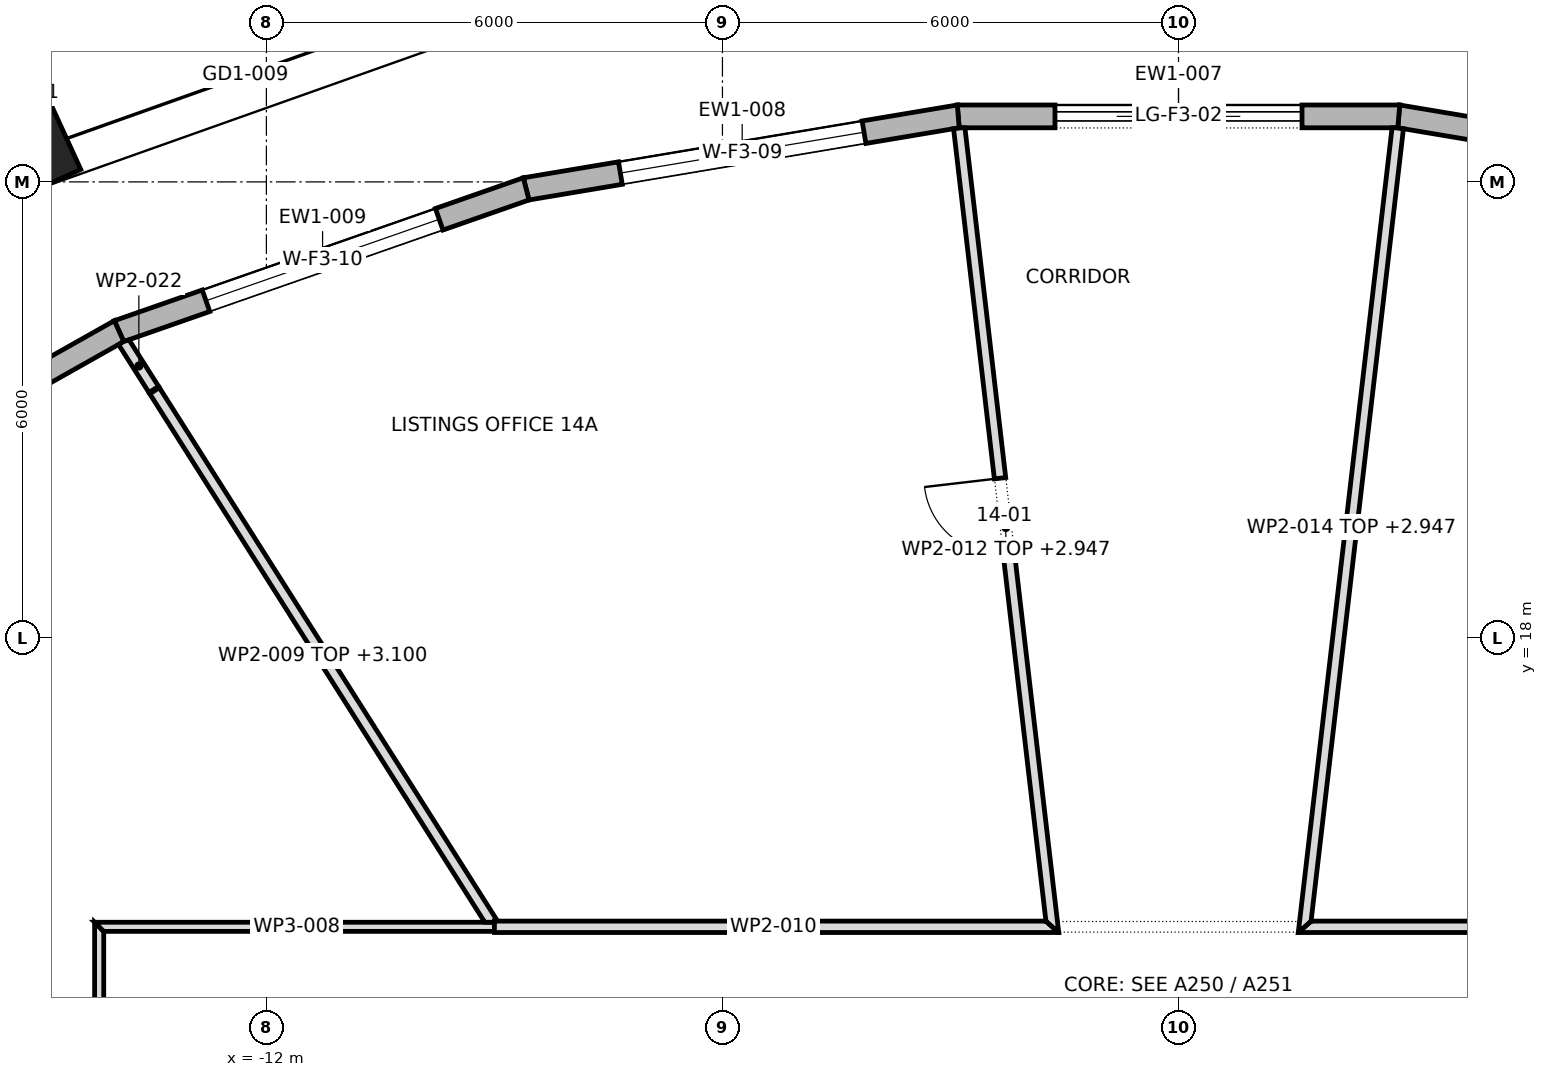
"""IFC4 building model, lengths in metres.
Left out: names, types, materials, properties, quantities, classifications, styles, units other than length and angle.
Written with IfcOpenShell. Run it as: python <this file> out.ifc"""

import sys

from ifc_helpers import new_model, si_unit, direction, frame, frame_2d, origin, origin_2d, place, context, subcontext, project, spatial, polyline, rectangle, outline, extrude, element, fill, save


model = new_model("IFC4")
c1 = context("Model", 3, precision=1e-05, world=origin(), true_north=direction((0.0, 1.0)))
c2 = subcontext(c1, "Body", "Model", "MODEL_VIEW")
j1 = project(units=[si_unit("LENGTHUNIT", "METRE"), si_unit("PLANEANGLEUNIT", "RADIAN")], contexts=[c1])
p1 = place(None, origin())
s1 = spatial("IfcSite", under=j1, at=p1, CompositionType="ELEMENT")
p2 = place(p1, origin())
s2 = spatial("IfcBuilding", under=s1, at=p2, CompositionType="ELEMENT")
p3 = place(p2, frame((0.0, 0.0, 202.9)))
s3 = spatial("IfcBuildingStorey", under=s2, at=p3, CompositionType="ELEMENT", Elevation=202.9)
p4 = place(p3, frame((-15.196, 24.369, 0.0), z_axis=(0.0, 0.0, 1.0), x_axis=(-0.909126368869, -0.416520402174, 0.0)))
e1 = element("IfcColumn", 1, at=p4, inside=s3, PredefinedType="COLUMN", context=c2, shape_type="SweptSolid", body=[
    extrude(rectangle(XDim=1.2, YDim=1.0, at=origin_2d()), origin(), (0.0, 0.0, 1.0), 4.0),
])
p5 = place(p3, frame((8.583, 23.908, 0.0), z_axis=(0.0, 0.0, 1.0), x_axis=(-0.98622052717, 0.165436005116, 0.0)))
e2 = element("IfcWall", 2, at=p5, inside=s3, PredefinedType="STANDARD", context=c2, shape_type="SweptSolid", body=[
    extrude(outline(polyline([(-0.013, -0.15), (5.777, -0.15), (5.752, 0.15), (0.013, 0.15), (-0.013, -0.15)])), origin(), (0.0, 0.0, 1.0), 3.7),
])
p6 = place(p5, frame((1.257, 0.0, 0.6)))
e3 = element("IfcOpeningElement", 3, at=p6, cuts=e2, PredefinedType="OPENING", context=c2, shape_type="SweptSolid", body=[
    extrude(rectangle(XDim=3.25, YDim=2.65, at=frame_2d((1.625, 1.325))), frame((0.0, 0.162, 0.0), z_axis=(0.0, -1.0, 0.0), x_axis=(1.0, 0.0, 0.0)), (0.0, 0.0, 1.0), 0.324),
])
p7 = place(p3, frame((2.898, 24.862, 0.0), z_axis=(0.0, 0.0, 1.0), x_axis=(-1.0, 0.0, 0.0)))
e4 = element("IfcWall", 4, at=p7, inside=s3, PredefinedType="STANDARD", context=c2, shape_type="SweptSolid", body=[
    extrude(outline(polyline([(-0.012, -0.15), (5.808, -0.15), (5.783, 0.15), (0.012, 0.15), (-0.012, -0.15)])), origin(), (0.0, 0.0, 1.0), 3.7),
])
p8 = place(p7, frame((1.273, 0.0, 0.0)))
e5 = element("IfcOpeningElement", 5, at=p8, cuts=e4, PredefinedType="OPENING", context=c2, shape_type="SweptSolid", body=[
    extrude(rectangle(XDim=3.25, YDim=3.25, at=frame_2d((1.625, 1.625))), frame((0.0, 0.162, 0.0), z_axis=(0.0, -1.0, 0.0), x_axis=(1.0, 0.0, 0.0)), (0.0, 0.0, 1.0), 0.324),
])
p9 = place(p3, frame((-2.898, 24.862, 0.0), z_axis=(0.0, 0.0, 1.0), x_axis=(-0.98622052717, -0.165436005116, 0.0)))
e6 = element("IfcWall", 6, at=p9, inside=s3, PredefinedType="STANDARD", context=c2, shape_type="SweptSolid", body=[
    extrude(outline(polyline([(-0.012, -0.15), (5.777, -0.15), (5.751, 0.15), (0.012, 0.15), (-0.012, -0.15)])), origin(), (0.0, 0.0, 1.0), 3.7),
])
p10 = place(p9, frame((1.257, 0.0, 0.6)))
e7 = element("IfcOpeningElement", 7, at=p10, cuts=e6, PredefinedType="OPENING", context=c2, shape_type="SweptSolid", body=[
    extrude(rectangle(XDim=3.25, YDim=2.65, at=frame_2d((1.625, 1.325))), frame((0.0, 0.162, 0.0), z_axis=(0.0, -1.0, 0.0), x_axis=(1.0, 0.0, 0.0)), (0.0, 0.0, 1.0), 0.324),
])
p11 = place(p3, frame((-8.583, 23.908, 0.0), z_axis=(0.0, 0.0, 1.0), x_axis=(-0.944023272224, -0.329878858824, 0.0)))
e8 = element("IfcWall", 8, at=p11, inside=s3, PredefinedType="STANDARD", context=c2, shape_type="SweptSolid", body=[
    extrude(outline(polyline([(-0.013, -0.15), (5.687, -0.15), (5.66, 0.15), (0.013, 0.15), (-0.013, -0.15)])), origin(), (0.0, 0.0, 1.0), 3.7),
])
p12 = place(p11, frame((1.212, 0.0, 0.6)))
e9 = element("IfcOpeningElement", 9, at=p12, cuts=e8, PredefinedType="OPENING", context=c2, shape_type="SweptSolid", body=[
    extrude(rectangle(XDim=3.25, YDim=2.65, at=frame_2d((1.625, 1.325))), frame((0.0, 0.162, 0.0), z_axis=(0.0, -1.0, 0.0), x_axis=(1.0, 0.0, 0.0)), (0.0, 0.0, 1.0), 0.324),
])
p13 = place(p3, frame((-13.938, 22.037, 0.0), z_axis=(0.0, 0.0, 1.0), x_axis=(-0.871140546168, -0.491033755278, 0.0)))
e10 = element("IfcWall", 10, at=p13, inside=s3, PredefinedType="STANDARD", context=c2, shape_type="SweptSolid", body=[
    extrude(outline(polyline([(-0.013, -0.15), (5.55, -0.15), (5.521, 0.15), (0.013, 0.15), (-0.013, -0.15)])), origin(), (0.0, 0.0, 1.0), 3.7),
])
p14 = place(p13, frame((1.143, 0.0, 0.6)))
e11 = element("IfcOpeningElement", 11, at=p14, cuts=e10, PredefinedType="OPENING", context=c2, shape_type="SweptSolid", body=[
    extrude(rectangle(XDim=3.25, YDim=2.65, at=frame_2d((1.625, 1.325))), frame((0.0, 0.162, 0.0), z_axis=(0.0, -1.0, 0.0), x_axis=(1.0, 0.0, 0.0)), (0.0, 0.0, 1.0), 0.324),
])
p15 = place(p3, frame((-14.2, 1.115, 0.0), z_axis=(0.0, 0.0, 1.0), x_axis=(0.0, 1.0, 0.0)))
e12 = element("IfcWall", 12, at=p15, inside=s3, PredefinedType="PARTITIONING", context=c2, shape_type="SweptSolid", body=[
    extrude(outline(polyline([(0.0, -0.06), (1.861, -0.06), (3.721, -0.06), (5.582, -0.06), (7.443, -0.06), (9.304, -0.06), (11.164, -0.06), (13.025, -0.06), (13.145, 0.06), (11.286, 0.06), (9.427, 0.06), (7.567, 0.06), (5.708, 0.06), (3.849, 0.06), (1.99, 0.06), (0.13, 0.06), (0.0, -0.06), (0.0, -0.06)])), origin(), (0.0, 0.0, 1.0), 3.7),
])
p16 = place(p3, frame((-14.26, 14.2, 0.0), z_axis=(0.0, 0.0, 1.0), x_axis=(1.0, 0.0, 0.0)))
e13 = element("IfcWall", 13, at=p16, inside=s3, PredefinedType="PARTITIONING", context=c2, shape_type="SweptSolid", body=[
    extrude(outline(polyline([(5.26, 0.06), (3.507, 0.06), (1.753, 0.06), (0.0, 0.06), (0.12, -0.06), (1.833, -0.06), (3.547, -0.06), (5.26, -0.06), (5.26, 0.06)])), origin(), (0.0, 0.0, 1.0), 3.7),
])
p17 = place(p3, frame((-9.022, 14.235, 0.0), z_axis=(0.0, 0.0, 1.0), x_axis=(-0.535448600055, 0.844567816519, 0.0)))
e14 = element("IfcWall", 14, at=p17, inside=s3, PredefinedType="PARTITIONING", context=c2, shape_type="SweptSolid", body=[
    extrude(outline(polyline([(8.319, 0.075), (6.67, 0.075), (5.022, 0.075), (3.374, 0.075), (1.725, 0.075), (0.077, 0.075), (0.009, -0.032), (0.022, -0.04), (0.0, -0.074), (0.0, -0.075), (1.664, -0.075), (3.328, -0.075), (4.991, -0.075), (6.655, -0.075), (8.319, -0.075), (8.319, 0.075)])), origin(), (0.0, 0.0, 1.0), 3.1),
])
p18 = place(p3, frame((-9.0, 14.2, 0.0), z_axis=(0.0, 0.0, 1.0), x_axis=(1.0, 0.0, 0.0)))
e15 = element("IfcWall", 15, at=p18, inside=s3, PredefinedType="PARTITIONING", context=c2, shape_type="SweptSolid", body=[
    extrude(outline(polyline([(0.0, -0.075), (1.856, -0.075), (3.712, -0.075), (5.568, -0.075), (7.424, -0.075), (7.256, 0.075), (5.442, 0.075), (3.628, 0.075), (1.814, 0.075), (0.0, 0.075), (0.0, -0.075)])), origin(), (0.0, 0.0, 1.0), 3.7),
])
p19 = place(p3, frame((-1.65, 14.116, 0.0), z_axis=(0.0, 0.0, 1.0), x_axis=(-0.115779808049, 0.99327490457, 0.0)))
e16 = element("IfcWall", 16, at=p19, inside=s3, PredefinedType="PARTITIONING", context=c2, shape_type="SweptSolid", body=[
    extrude(outline(polyline([(0.0, -0.075), (1.777, -0.075), (3.553, -0.075), (5.329, -0.075), (7.106, -0.075), (8.882, -0.075), (10.659, -0.075), (10.664, -0.033), (10.664, 0.075), (8.914, 0.075), (7.165, 0.075), (5.416, 0.075), (3.667, 0.075), (1.918, 0.075), (0.168, 0.075), (0.084, 0.0), (0.0, -0.075)])), origin(), (0.0, 0.0, 1.0), 2.947),
])
p20 = place(p19, frame((5.026, 0.0, 0.0)))
e17 = element("IfcOpeningElement", 17, at=p20, cuts=e16, PredefinedType="OPENING", context=c2, shape_type="SweptSolid", body=[
    extrude(rectangle(XDim=1.0, YDim=2.1, at=frame_2d((0.5, 1.05))), frame((0.0, 0.087, 0.0), z_axis=(0.0, -1.0, 0.0), x_axis=(1.0, 0.0, 0.0)), (0.0, 0.0, 1.0), 0.174),
])
p21 = place(p3, frame((1.576, 14.2, 0.0), z_axis=(0.0, 0.0, 1.0), x_axis=(1.0, 0.0, 0.0)))
e18 = element("IfcWall", 18, at=p21, inside=s3, PredefinedType="PARTITIONING", context=c2, shape_type="SweptSolid", body=[
    extrude(outline(polyline([(0.0, -0.075), (1.793, -0.075), (3.585, -0.075), (5.378, -0.075), (7.171, -0.075), (8.964, -0.075), (10.757, -0.075), (12.549, -0.075), (12.699, 0.075), (10.909, 0.075), (9.119, 0.075), (7.329, 0.075), (5.539, 0.075), (3.749, 0.075), (1.958, 0.075), (0.168, 0.075), (0.0, -0.075)])), origin(), (0.0, 0.0, 1.0), 3.7),
])
p22 = place(p21, frame((5.454, 0.0, 0.0)))
e19 = element("IfcOpeningElement", 19, at=p22, cuts=e18, PredefinedType="OPENING", context=c2, shape_type="SweptSolid", body=[
    extrude(rectangle(XDim=1.8, YDim=2.1, at=frame_2d((0.9, 1.05))), frame((0.0, 0.087, 0.0), z_axis=(0.0, -1.0, 0.0), x_axis=(1.0, 0.0, 0.0)), (0.0, 0.0, 1.0), 0.174),
])
p23 = place(p3, frame((2.885, 24.708, 0.0), z_axis=(0.0, 0.0, 1.0), x_axis=(-0.115779808049, -0.99327490457, 0.0)))
e20 = element("IfcWall", 20, at=p23, inside=s3, PredefinedType="PARTITIONING", context=c2, shape_type="SweptSolid", body=[
    extrude(outline(polyline([(0.005, -0.075), (1.781, -0.075), (3.558, -0.075), (5.334, -0.075), (7.111, -0.075), (8.887, -0.075), (10.663, -0.075), (10.579, 0.0), (10.495, 0.075), (8.746, 0.075), (6.997, 0.075), (5.248, 0.075), (3.498, 0.075), (1.749, 0.075), (0.0, 0.075), (0.0, -0.034), (0.005, -0.075)])), origin(), (0.0, 0.0, 1.0), 2.947),
])
p24 = place(p3, frame((-13.477, 21.261, 0.0), z_axis=(0.0, 0.0, 1.0), x_axis=(-0.53535127514, 0.844629511802, 0.0)))
e21 = element("IfcWall", 21, at=p24, inside=s3, PredefinedType="PARTITIONING", context=c2, shape_type="SweptSolid", body=[
    extrude(outline(polyline([(0.0, -0.075), (0.737, -0.075), (0.753, -0.004), (0.757, 0.07), (0.757, 0.075), (0.0, 0.075), (0.0, -0.075)])), origin(), (0.0, 0.0, 1.0), 3.7),
])
p25 = place(p8, origin())
e22 = element("IfcDoor", 22, at=p25, inside=s3, OperationType="DOUBLE_DOOR_SLIDING", PredefinedType="DOOR", context=c2, shape_type="SweptSolid", body=[
    extrude(rectangle(XDim=3.25, YDim=3.25, at=frame_2d((1.625, 1.625))), frame((0.0, 0.025, 0.0), z_axis=(0.0, -1.0, 0.0), x_axis=(1.0, 0.0, 0.0)), (0.0, 0.0, 1.0), 0.05),
])
fill(e5, e22)
p26 = place(p10, origin())
e23 = element("IfcWindow", 23, at=p26, inside=s3, PartitioningType="TRIPLE_PANEL_VERTICAL", PredefinedType="WINDOW", context=c2, shape_type="SweptSolid", body=[
    extrude(rectangle(XDim=3.25, YDim=2.65, at=frame_2d((1.625, 1.325))), frame((0.0, 0.03, 0.0), z_axis=(0.0, -1.0, 0.0), x_axis=(1.0, 0.0, 0.0)), (0.0, 0.0, 1.0), 0.06),
])
fill(e7, e23)
p27 = place(p12, origin())
e24 = element("IfcWindow", 24, at=p27, inside=s3, PartitioningType="TRIPLE_PANEL_VERTICAL", PredefinedType="WINDOW", context=c2, shape_type="SweptSolid", body=[
    extrude(rectangle(XDim=3.25, YDim=2.65, at=frame_2d((1.625, 1.325))), frame((0.0, 0.03, 0.0), z_axis=(0.0, -1.0, 0.0), x_axis=(1.0, 0.0, 0.0)), (0.0, 0.0, 1.0), 0.06),
])
fill(e9, e24)
p28 = place(p20, origin())
e25 = element("IfcDoor", 25, at=p28, inside=s3, OperationType="SINGLE_SWING_LEFT", PredefinedType="DOOR", context=c2, shape_type="SweptSolid", body=[
    extrude(rectangle(XDim=1.0, YDim=2.1, at=frame_2d((0.5, 1.05))), frame((0.0, 0.025, 0.0), z_axis=(0.0, -1.0, 0.0), x_axis=(1.0, 0.0, 0.0)), (0.0, 0.0, 1.0), 0.05),
])
fill(e17, e25)
save(model, sys.argv[1])
